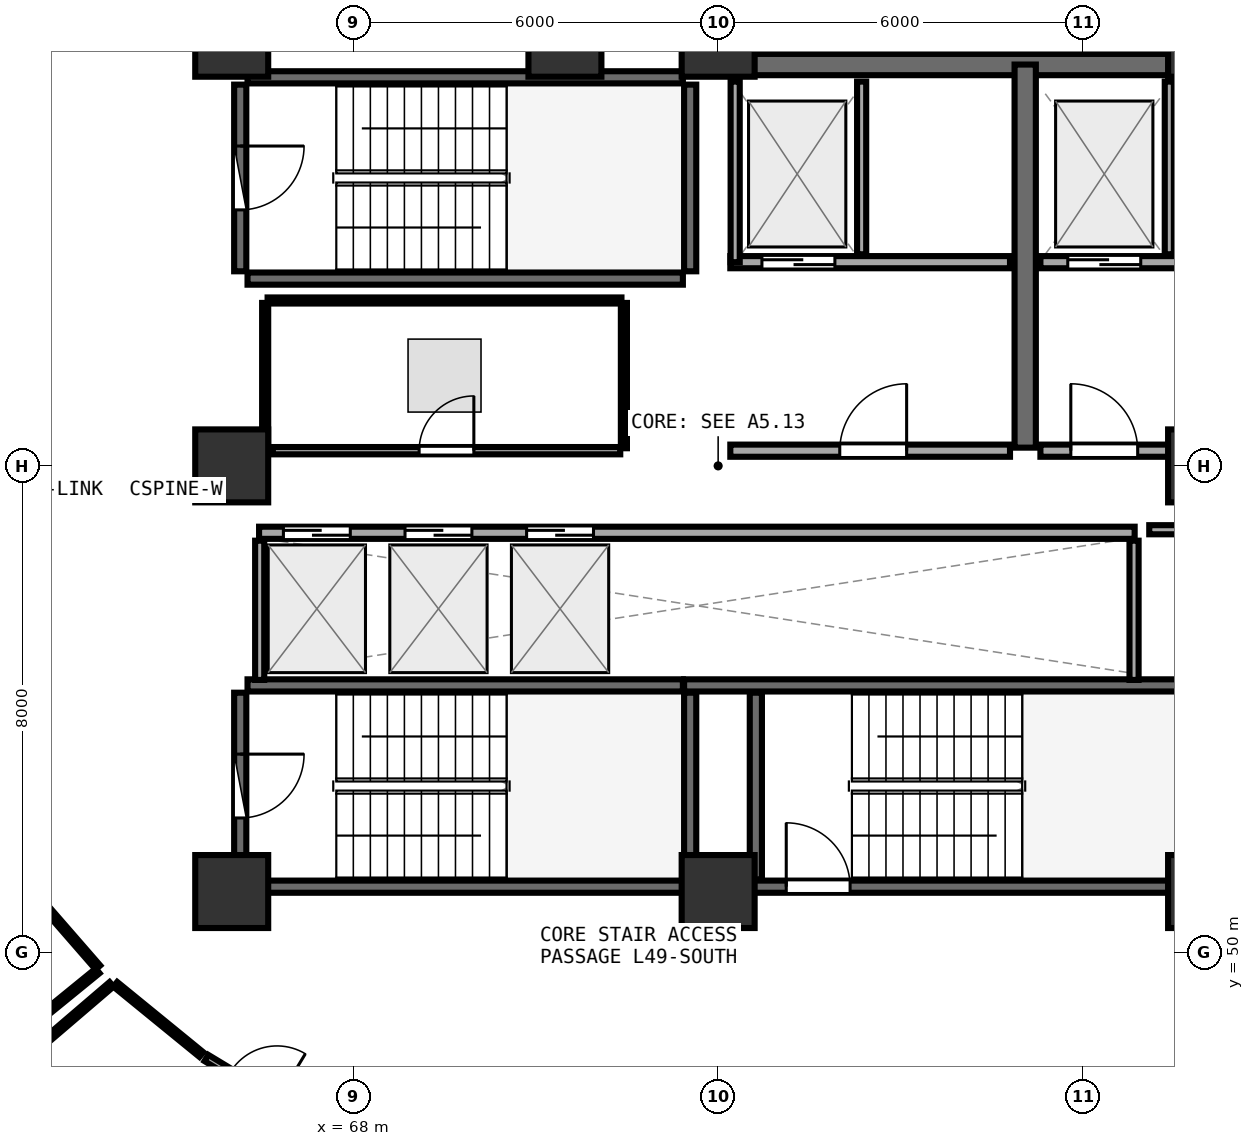
"""IFC4 building model, lengths in metres.
Left out: names, types, materials, properties, quantities, classifications, styles, units other than length and angle.
Written with IfcOpenShell. Run it as: python <this file> out.ifc"""

import sys

from ifc_helpers import new_model, si_unit, direction, frame, frame_2d, origin, origin_2d, place, context, subcontext, project, spatial, rectangle, extrude, element, fill, save


model = new_model("IFC4")
c1 = context("Model", 3, precision=1e-05, world=origin(), true_north=direction((0.0, 1.0)))
c2 = subcontext(c1, "Body", "Model", "MODEL_VIEW")
j1 = project(units=[si_unit("LENGTHUNIT", "METRE"), si_unit("PLANEANGLEUNIT", "RADIAN")], contexts=[c1])
p1 = place(None, origin())
s1 = spatial("IfcSite", under=j1, at=p1, CompositionType="ELEMENT")
p2 = place(p1, origin())
s2 = spatial("IfcBuilding", under=s1, at=p2, CompositionType="ELEMENT")
p3 = place(p2, frame((0.0, 0.0, 193.2)))
s3 = spatial("IfcBuildingStorey", under=s2, at=p3, CompositionType="ELEMENT", Elevation=193.2)
for number, where, z_axis, x_axis in (
    (1, (66.0, 51.0, 0.0), (0.0, 0.0, 1.0), (1.0, 0.0, 0.0)),
    (2, (74.0, 51.0, 0.0), (0.0, 0.0, 1.0), (1.0, 0.0, 0.0)),
    (3, (82.0, 51.0, 0.0), (0.0, 0.0, 1.0), (1.0, 0.0, 0.0)),
    (4, (82.0, 58.0, 0.0), (0.0, 0.0, 1.0), (1.0, 0.0, 0.0)),
    (5, (82.0, 65.0, 0.0), (0.0, 0.0, 1.0), (1.0, 0.0, 0.0)),
    (6, (74.0, 65.0, 0.0), (0.0, 0.0, 1.0), (1.0, 0.0, 0.0)),
    (7, (71.48, 65.0, 0.0), (0.0, 0.0, 1.0), (1.0, 0.0, 0.0)),
    (8, (66.0, 65.0, 0.0), (0.0, 0.0, 1.0), (1.0, 0.0, 0.0)),
    (9, (66.0, 58.0, 0.0), (0.0, 0.0, 1.0), (1.0, 0.0, 0.0)),
):
    element("IfcColumn", number, at=place(p3, frame(where, z_axis=z_axis, x_axis=x_axis)), inside=s3, PredefinedType="PILASTER", context=c2, shape_type="SweptSolid", body=[
        extrude(rectangle(XDim=1.2, YDim=1.2, at=origin_2d()), origin(), (0.0, 0.0, 1.0), 3.75),
    ])
p4 = place(p3, frame((66.26, 61.08, 0.0), z_axis=(0.0, 0.0, 1.0), x_axis=(1.0, 0.0, 0.0)))
e10 = element("IfcWall", 10, at=p4, inside=s3, PredefinedType="SHEAR", context=c2, shape_type="SweptSolid", body=[
    extrude(rectangle(XDim=7.16, YDim=0.2, at=frame_2d((3.58, 0.0))), origin(), (0.0, 0.0, 1.0), 3.49),
])
p5 = place(p3, frame((73.54, 61.2, 0.0), z_axis=(0.0, 0.0, 1.0), x_axis=(0.0, 1.0, 0.0)))
e11 = element("IfcWall", 11, at=p5, inside=s3, PredefinedType="SHEAR", context=c2, shape_type="SweptSolid", body=[
    extrude(rectangle(XDim=3.07, YDim=0.2, at=frame_2d((1.535, 0.0))), origin(), (0.0, 0.0, 1.0), 3.49),
])
p6 = place(p3, frame((73.42, 64.39, 0.0), z_axis=(0.0, 0.0, 1.0), x_axis=(-1.0, 0.0, 0.0)))
e12 = element("IfcWall", 12, at=p6, inside=s3, PredefinedType="SHEAR", context=c2, shape_type="SweptSolid", body=[
    extrude(rectangle(XDim=7.16, YDim=0.2, at=frame_2d((3.58, 0.0))), origin(), (0.0, 0.0, 1.0), 3.49),
])
p7 = place(p3, frame((66.14, 64.27, 0.0), z_axis=(0.0, 0.0, 1.0), x_axis=(0.0, -1.0, 0.0)))
e13 = element("IfcWall", 13, at=p7, inside=s3, PredefinedType="SHEAR", context=c2, shape_type="SweptSolid", body=[
    extrude(rectangle(XDim=3.07, YDim=0.2, at=frame_2d((1.535, 0.0))), origin(), (0.0, 0.0, 1.0), 3.49),
])
p8 = place(p7, frame((1.01, 0.0, 0.0)))
e14 = element("IfcOpeningElement", 14, at=p8, cuts=e13, PredefinedType="OPENING", context=c2, shape_type="SweptSolid", body=[
    extrude(rectangle(XDim=1.05, YDim=2.1, at=frame_2d((0.525, 1.05))), frame((0.0, 0.11, 0.0), z_axis=(0.0, -1.0, 0.0), x_axis=(1.0, 0.0, 0.0)), (0.0, 0.0, 1.0), 0.22),
])
p9 = place(p3, frame((74.0, 51.08, 0.0), z_axis=(0.0, 0.0, 1.0), x_axis=(1.0, 0.0, 0.0)))
e15 = element("IfcWall", 15, at=p9, inside=s3, PredefinedType="SHEAR", context=c2, shape_type="SweptSolid", body=[
    extrude(rectangle(XDim=7.9, YDim=0.2, at=frame_2d((3.95, 0.0))), origin(), (0.0, 0.0, 1.0), 3.49),
])
p10 = place(p9, frame((1.12, 0.0, 0.0)))
e16 = element("IfcOpeningElement", 16, at=p10, cuts=e15, PredefinedType="OPENING", context=c2, shape_type="SweptSolid", body=[
    extrude(rectangle(XDim=1.05, YDim=2.1, at=frame_2d((0.525, 1.05))), frame((0.0, 0.11, 0.0), z_axis=(0.0, -1.0, 0.0), x_axis=(1.0, 0.0, 0.0)), (0.0, 0.0, 1.0), 0.22),
])
p11 = place(p3, frame((81.9, 54.39, 0.0), z_axis=(0.0, 0.0, 1.0), x_axis=(-1.0, 0.0, 0.0)))
e17 = element("IfcWall", 17, at=p11, inside=s3, PredefinedType="SHEAR", context=c2, shape_type="SweptSolid", body=[
    extrude(rectangle(XDim=8.46, YDim=0.2, at=frame_2d((4.23, 0.0))), origin(), (0.0, 0.0, 1.0), 3.49),
])
p12 = place(p3, frame((74.62, 54.27, 0.0), z_axis=(0.0, 0.0, 1.0), x_axis=(0.0, -1.0, 0.0)))
e18 = element("IfcWall", 18, at=p12, inside=s3, PredefinedType="SHEAR", context=c2, shape_type="SweptSolid", body=[
    extrude(rectangle(XDim=3.07, YDim=0.2, at=frame_2d((1.535, 0.0))), origin(), (0.0, 0.0, 1.0), 3.49),
])
p13 = place(p3, frame((66.26, 51.08, 0.0), z_axis=(0.0, 0.0, 1.0), x_axis=(1.0, 0.0, 0.0)))
e19 = element("IfcWall", 19, at=p13, inside=s3, PredefinedType="SHEAR", context=c2, shape_type="SweptSolid", body=[
    extrude(rectangle(XDim=7.16, YDim=0.2, at=frame_2d((3.58, 0.0))), origin(), (0.0, 0.0, 1.0), 3.49),
])
p14 = place(p3, frame((73.54, 51.2, 0.0), z_axis=(0.0, 0.0, 1.0), x_axis=(0.0, 1.0, 0.0)))
e20 = element("IfcWall", 20, at=p14, inside=s3, PredefinedType="SHEAR", context=c2, shape_type="SweptSolid", body=[
    extrude(rectangle(XDim=3.07, YDim=0.2, at=frame_2d((1.535, 0.0))), origin(), (0.0, 0.0, 1.0), 3.49),
])
p15 = place(p3, frame((73.42, 54.39, 0.0), z_axis=(0.0, 0.0, 1.0), x_axis=(-1.0, 0.0, 0.0)))
e21 = element("IfcWall", 21, at=p15, inside=s3, PredefinedType="SHEAR", context=c2, shape_type="SweptSolid", body=[
    extrude(rectangle(XDim=7.16, YDim=0.2, at=frame_2d((3.58, 0.0))), origin(), (0.0, 0.0, 1.0), 3.49),
])
p16 = place(p3, frame((66.14, 54.27, 0.0), z_axis=(0.0, 0.0, 1.0), x_axis=(0.0, -1.0, 0.0)))
e22 = element("IfcWall", 22, at=p16, inside=s3, PredefinedType="SHEAR", context=c2, shape_type="SweptSolid", body=[
    extrude(rectangle(XDim=3.07, YDim=0.2, at=frame_2d((1.535, 0.0))), origin(), (0.0, 0.0, 1.0), 3.49),
])
p17 = place(p16, frame((1.01, 0.0, 0.0)))
e23 = element("IfcOpeningElement", 23, at=p17, cuts=e22, PredefinedType="OPENING", context=c2, shape_type="SweptSolid", body=[
    extrude(rectangle(XDim=1.05, YDim=2.1, at=frame_2d((0.525, 1.05))), frame((0.0, 0.11, 0.0), z_axis=(0.0, -1.0, 0.0), x_axis=(1.0, 0.0, 0.0)), (0.0, 0.0, 1.0), 0.22),
])
p18 = place(p3, frame((74.0, 64.6, 0.0), z_axis=(0.0, 0.0, 1.0), x_axis=(1.0, 0.0, 0.0)))
e24 = element("IfcWall", 24, at=p18, inside=s3, PredefinedType="SHEAR", context=c2, shape_type="SweptSolid", body=[
    extrude(rectangle(XDim=8.0, YDim=0.35, at=frame_2d((4.0, 0.0))), origin(), (0.0, 0.0, 1.0), 3.49),
])
p19 = place(p3, frame((79.05, 58.3, 0.0), z_axis=(0.0, 0.0, 1.0), x_axis=(0.0, 1.0, 0.0)))
e25 = element("IfcWall", 25, at=p19, inside=s3, PredefinedType="SHEAR", context=c2, shape_type="SweptSolid", body=[
    extrude(rectangle(XDim=6.3, YDim=0.35, at=frame_2d((3.15, 0.0))), origin(), (0.0, 0.0, 1.0), 3.49),
])
p20 = place(p3, frame((74.2, 61.35, 0.0), z_axis=(0.0, 0.0, 1.0), x_axis=(1.0, 0.0, 0.0)))
e26 = element("IfcWall", 26, at=p20, inside=s3, PredefinedType="SOLIDWALL", context=c2, shape_type="SweptSolid", body=[
    extrude(rectangle(XDim=4.6, YDim=0.2, at=frame_2d((2.3, 0.0))), origin(), (0.0, 0.0, 1.0), 3.48),
])
p21 = place(p20, frame((0.52, 0.0, 0.0)))
e27 = element("IfcOpeningElement", 27, at=p21, cuts=e26, PredefinedType="OPENING", context=c2, shape_type="SweptSolid", body=[
    extrude(rectangle(XDim=1.2, YDim=2.15, at=frame_2d((0.6, 1.075))), frame((0.0, 0.11, 0.0), z_axis=(0.0, -1.0, 0.0), x_axis=(1.0, 0.0, 0.0)), (0.0, 0.0, 1.0), 0.22),
])
p22 = place(p3, frame((74.28, 61.35, 0.0), z_axis=(0.0, 0.0, 1.0), x_axis=(0.0, 1.0, 0.0)))
e28 = element("IfcWall", 28, at=p22, inside=s3, PredefinedType="PARTITIONING", context=c2, shape_type="SweptSolid", body=[
    extrude(rectangle(XDim=2.97, YDim=0.15, at=frame_2d((1.485, 0.0))), origin(), (0.0, 0.0, 1.0), 3.48),
])
p23 = place(p3, frame((76.36, 61.48, 0.0), z_axis=(0.0, 0.0, 1.0), x_axis=(0.0, 1.0, 0.0)))
e29 = element("IfcWall", 29, at=p23, inside=s3, PredefinedType="PARTITIONING", context=c2, shape_type="SweptSolid", body=[
    extrude(rectangle(XDim=2.84, YDim=0.15, at=frame_2d((1.42, 0.0))), origin(), (0.0, 0.0, 1.0), 3.48),
])
p24 = place(p3, frame((79.3, 61.35, 0.0), z_axis=(0.0, 0.0, 1.0), x_axis=(1.0, 0.0, 0.0)))
e30 = element("IfcWall", 30, at=p24, inside=s3, PredefinedType="SOLIDWALL", context=c2, shape_type="SweptSolid", body=[
    extrude(rectangle(XDim=4.0, YDim=0.2, at=frame_2d((2.0, 0.0))), origin(), (0.0, 0.0, 1.0), 2.775),
])
p25 = place(p24, frame((0.45, 0.0, 0.0)))
e31 = element("IfcOpeningElement", 31, at=p25, cuts=e30, PredefinedType="OPENING", context=c2, shape_type="SweptSolid", body=[
    extrude(rectangle(XDim=1.2, YDim=2.15, at=frame_2d((0.6, 1.075))), frame((0.0, 0.11, 0.0), z_axis=(0.0, -1.0, 0.0), x_axis=(1.0, 0.0, 0.0)), (0.0, 0.0, 1.0), 0.22),
])
p26 = place(p3, frame((81.42, 61.48, 0.0), z_axis=(0.0, 0.0, 1.0), x_axis=(0.0, 1.0, 0.0)))
e32 = element("IfcWall", 32, at=p26, inside=s3, PredefinedType="PARTITIONING", context=c2, shape_type="SweptSolid", body=[
    extrude(rectangle(XDim=2.84, YDim=0.15, at=frame_2d((1.42, 0.0))), origin(), (0.0, 0.0, 1.0), 3.48),
])
p27 = place(p3, frame((74.2, 58.25, 0.0), z_axis=(0.0, 0.0, 1.0), x_axis=(1.0, 0.0, 0.0)))
e33 = element("IfcWall", 33, at=p27, inside=s3, PredefinedType="SOLIDWALL", context=c2, shape_type="SweptSolid", body=[
    extrude(rectangle(XDim=4.6, YDim=0.2, at=frame_2d((2.3, 0.0))), origin(), (0.0, 0.0, 1.0), 3.48),
])
p28 = place(p27, frame((1.8, 0.0, 0.0)))
e34 = element("IfcOpeningElement", 34, at=p28, cuts=e33, PredefinedType="OPENING", context=c2, shape_type="SweptSolid", body=[
    extrude(rectangle(XDim=1.1, YDim=2.1, at=frame_2d((0.55, 1.05))), frame((0.0, 0.11, 0.0), z_axis=(0.0, -1.0, 0.0), x_axis=(1.0, 0.0, 0.0)), (0.0, 0.0, 1.0), 0.22),
])
p29 = place(p3, frame((79.3, 58.25, 0.0), z_axis=(0.0, 0.0, 1.0), x_axis=(1.0, 0.0, 0.0)))
e35 = element("IfcWall", 35, at=p29, inside=s3, PredefinedType="SOLIDWALL", context=c2, shape_type="SweptSolid", body=[
    extrude(rectangle(XDim=4.0, YDim=0.2, at=frame_2d((2.0, 0.0))), origin(), (0.0, 0.0, 1.0), 2.775),
])
p30 = place(p29, frame((0.5, 0.0, 0.0)))
e36 = element("IfcOpeningElement", 36, at=p30, cuts=e35, PredefinedType="OPENING", context=c2, shape_type="SweptSolid", body=[
    extrude(rectangle(XDim=1.1, YDim=2.1, at=frame_2d((0.55, 1.05))), frame((0.0, 0.11, 0.0), z_axis=(0.0, -1.0, 0.0), x_axis=(1.0, 0.0, 0.0)), (0.0, 0.0, 1.0), 0.22),
])
p31 = place(p3, frame((66.45, 56.9, 0.0), z_axis=(0.0, 0.0, 1.0), x_axis=(1.0, 0.0, 0.0)))
e37 = element("IfcWall", 37, at=p31, inside=s3, PredefinedType="SOLIDWALL", context=c2, shape_type="SweptSolid", body=[
    extrude(rectangle(XDim=14.4, YDim=0.2, at=frame_2d((7.2, 0.0))), origin(), (0.0, 0.0, 1.0), 3.48),
])
p32 = place(p31, frame((0.4, 0.0, 0.0)))
e38 = element("IfcOpeningElement", 38, at=p32, cuts=e37, PredefinedType="OPENING", context=c2, shape_type="SweptSolid", body=[
    extrude(rectangle(XDim=1.1, YDim=2.1, at=frame_2d((0.55, 1.05))), frame((0.0, 0.11, 0.0), z_axis=(0.0, -1.0, 0.0), x_axis=(1.0, 0.0, 0.0)), (0.0, 0.0, 1.0), 0.22),
])
p33 = place(p31, frame((2.4, 0.0, 0.0)))
e39 = element("IfcOpeningElement", 39, at=p33, cuts=e37, PredefinedType="OPENING", context=c2, shape_type="SweptSolid", body=[
    extrude(rectangle(XDim=1.1, YDim=2.1, at=frame_2d((0.55, 1.05))), frame((0.0, 0.11, 0.0), z_axis=(0.0, -1.0, 0.0), x_axis=(1.0, 0.0, 0.0)), (0.0, 0.0, 1.0), 0.22),
])
p34 = place(p31, frame((4.4, 0.0, 0.0)))
e40 = element("IfcOpeningElement", 40, at=p34, cuts=e37, PredefinedType="OPENING", context=c2, shape_type="SweptSolid", body=[
    extrude(rectangle(XDim=1.1, YDim=2.1, at=frame_2d((0.55, 1.05))), frame((0.0, 0.11, 0.0), z_axis=(0.0, -1.0, 0.0), x_axis=(1.0, 0.0, 0.0)), (0.0, 0.0, 1.0), 0.22),
])
for number, where, z_axis, x_axis in (
    (41, (66.46, 54.48, 0.0), (0.0, 0.0, 1.0), (0.0, 1.0, 0.0)),
    (42, (80.84, 54.48, 0.0), (0.0, 0.0, 1.0), (0.0, 1.0, 0.0)),
):
    element("IfcWall", number, at=place(p3, frame(where, z_axis=z_axis, x_axis=x_axis)), inside=s3, PredefinedType="PARTITIONING", context=c2, shape_type="SweptSolid", body=[
        extrude(rectangle(XDim=2.29, YDim=0.15, at=frame_2d((1.145, 0.0))), origin(), (0.0, 0.0, 1.0), 3.48),
    ])
p35 = place(p3, frame((66.675, 58.25, 0.0), z_axis=(0.0, 0.0, 1.0), x_axis=(1.0, 0.0, 0.0)))
e43 = element("IfcWall", 43, at=p35, inside=s3, PredefinedType="PARTITIONING", context=c2, shape_type="SweptSolid", body=[
    extrude(rectangle(XDim=5.715, YDim=0.12, at=frame_2d((2.857, 0.0))), origin(), (0.0, 0.0, 1.0), 3.48),
])
p36 = place(p35, frame((2.407, 0.0, 0.0)))
e44 = element("IfcOpeningElement", 44, at=p36, cuts=e43, PredefinedType="OPENING", context=c2, shape_type="SweptSolid", body=[
    extrude(rectangle(XDim=0.9, YDim=2.08, at=frame_2d((0.45, 1.04))), frame((0.0, 0.07, 0.0), z_axis=(0.0, -1.0, 0.0), x_axis=(1.0, 0.0, 0.0)), (0.0, 0.0, 1.0), 0.14),
])
p37 = place(p3, frame((65.583, 48.263, 0.0), z_axis=(0.0, 0.0, 1.0), x_axis=(0.856160990593, -0.516709162089, 0.0)))
e45 = element("IfcWall", 45, at=p37, inside=s3, PredefinedType="PARTITIONING", context=c2, shape_type="SweptSolid", body=[
    extrude(rectangle(XDim=1.815, YDim=0.12, at=frame_2d((0.908, 0.0))), origin(), (0.0, 0.0, 1.0), 3.48),
])
p38 = place(p37, frame((0.458, 0.0, 0.0)))
e46 = element("IfcOpeningElement", 46, at=p38, cuts=e45, PredefinedType="OPENING", context=c2, shape_type="SweptSolid", body=[
    extrude(rectangle(XDim=0.9, YDim=2.08, at=frame_2d((0.45, 1.04))), frame((0.0, 0.07, 0.0), z_axis=(0.0, -1.0, 0.0), x_axis=(1.0, 0.0, 0.0)), (0.0, 0.0, 1.0), 0.14),
])
p39 = place(p3, frame((82.64, 56.95, 0.0), z_axis=(0.0, 0.0, 1.0), x_axis=(-1.0, 0.0, 0.0)))
e47 = element("IfcWall", 47, at=p39, inside=s3, PredefinedType="PARTITIONING", context=c2, shape_type="SweptSolid", body=[
    extrude(rectangle(XDim=1.55, YDim=0.15, at=frame_2d((0.775, 0.0))), origin(), (0.0, 0.0, 1.0), 2.775),
])
p40 = place(p3, frame((72.45, 58.29, 0.0), z_axis=(0.0, 0.0, 1.0), x_axis=(0.0, 1.0, 0.0)))
e48 = element("IfcWall", 48, at=p40, inside=s3, PredefinedType="PARTITIONING", context=c2, shape_type="SweptSolid", body=[
    extrude(rectangle(XDim=2.39, YDim=0.1, at=frame_2d((1.195, 0.0))), origin(), (0.0, 0.0, 1.0), 3.48),
])
p41 = place(p3, frame((72.41, 60.72, 0.0), z_axis=(0.0, 0.0, 1.0), x_axis=(-1.0, 0.0, 0.0)))
e49 = element("IfcWall", 49, at=p41, inside=s3, PredefinedType="PARTITIONING", context=c2, shape_type="SweptSolid", body=[
    extrude(rectangle(XDim=5.82, YDim=0.1, at=frame_2d((2.91, 0.0))), origin(), (0.0, 0.0, 1.0), 3.48),
])
p42 = place(p3, frame((66.55, 60.68, 0.0), z_axis=(0.0, 0.0, 1.0), x_axis=(0.0, -1.0, 0.0)))
e50 = element("IfcWall", 50, at=p42, inside=s3, PredefinedType="PARTITIONING", context=c2, shape_type="SweptSolid", body=[
    extrude(rectangle(XDim=2.383, YDim=0.1, at=frame_2d((1.191, 0.0))), origin(), (0.0, 0.0, 1.0), 3.48),
])
p43 = place(p3, frame((81.517, 47.692, 0.0), z_axis=(0.0, 0.0, 1.0), x_axis=(0.730053355202, 0.683390151055, 0.0)))
e51 = element("IfcWall", 51, at=p43, inside=s3, PredefinedType="PARTITIONING", context=c2, shape_type="SweptSolid", body=[
    extrude(rectangle(XDim=5.839, YDim=0.1, at=frame_2d((2.919, 0.0))), origin(), (0.0, 0.0, 1.0), 3.025),
])
p44 = place(p3, frame((62.622, 51.104, 0.0), z_axis=(0.0, 0.0, 1.0), x_axis=(0.656613410786, -0.754227305775, 0.0)))
e52 = element("IfcWall", 52, at=p44, inside=s3, PredefinedType="PARTITIONING", context=c2, shape_type="SweptSolid", body=[
    extrude(rectangle(XDim=1.793, YDim=0.1, at=frame_2d((0.896, 0.0))), origin(), (0.0, 0.0, 1.0), 3.025),
])
p45 = place(p3, frame((63.795, 49.696, 0.0), z_axis=(0.0, 0.0, 1.0), x_axis=(-0.775218498775, -0.631693184353, 0.0)))
e53 = element("IfcWall", 53, at=p45, inside=s3, PredefinedType="PARTITIONING", context=c2, shape_type="SweptSolid", body=[
    extrude(rectangle(XDim=7.52, YDim=0.1, at=frame_2d((3.76, 0.0))), origin(), (0.0, 0.0, 1.0), 3.025),
])
p46 = place(p3, frame((64.085, 49.475, 0.0), z_axis=(0.0, 0.0, 1.0), x_axis=(0.774837468284, -0.632160499986, 0.0)))
e54 = element("IfcWall", 54, at=p46, inside=s3, PredefinedType="PARTITIONING", context=c2, shape_type="SweptSolid", body=[
    extrude(rectangle(XDim=1.827, YDim=0.1, at=frame_2d((0.914, 0.0))), origin(), (0.0, 0.0, 1.0), 3.025),
])
p47 = place(p3, frame((58.325, 44.597, 0.0), z_axis=(0.0, 0.0, 1.0), x_axis=(0.759718239, 0.650252410476, 0.0)))
e55 = element("IfcWall", 55, at=p47, inside=s3, PredefinedType="PARTITIONING", context=c2, shape_type="SweptSolid", body=[
    extrude(rectangle(XDim=7.5, YDim=0.1, at=frame_2d((3.75, 0.0))), origin(), (0.0, 0.0, 1.0), 3.075),
])
p48 = place(p8, origin())
e56 = element("IfcDoor", 56, at=p48, inside=s3, OperationType="SINGLE_SWING_LEFT", PredefinedType="DOOR", context=c2, shape_type="SweptSolid", body=[
    extrude(rectangle(XDim=1.05, YDim=2.1, at=frame_2d((0.525, 1.05))), frame((0.0, 0.025, 0.0), z_axis=(0.0, -1.0, 0.0), x_axis=(1.0, 0.0, 0.0)), (0.0, 0.0, 1.0), 0.05),
])
fill(e14, e56)
p49 = place(p10, origin())
e57 = element("IfcDoor", 57, at=p49, inside=s3, OperationType="SINGLE_SWING_LEFT", PredefinedType="DOOR", context=c2, shape_type="SweptSolid", body=[
    extrude(rectangle(XDim=1.05, YDim=2.1, at=frame_2d((0.525, 1.05))), frame((0.0, 0.025, 0.0), z_axis=(0.0, -1.0, 0.0), x_axis=(1.0, 0.0, 0.0)), (0.0, 0.0, 1.0), 0.05),
])
fill(e16, e57)
p50 = place(p17, origin())
e58 = element("IfcDoor", 58, at=p50, inside=s3, OperationType="SINGLE_SWING_LEFT", PredefinedType="DOOR", context=c2, shape_type="SweptSolid", body=[
    extrude(rectangle(XDim=1.05, YDim=2.1, at=frame_2d((0.525, 1.05))), frame((0.0, 0.025, 0.0), z_axis=(0.0, -1.0, 0.0), x_axis=(1.0, 0.0, 0.0)), (0.0, 0.0, 1.0), 0.05),
])
fill(e23, e58)
p51 = place(p21, origin())
e59 = element("IfcDoor", 59, at=p51, inside=s3, OperationType="DOUBLE_DOOR_SLIDING", PredefinedType="DOOR", context=c2, shape_type="SweptSolid", body=[
    extrude(rectangle(XDim=1.2, YDim=2.15, at=frame_2d((0.6, 1.075))), frame((0.0, 0.025, 0.0), z_axis=(0.0, -1.0, 0.0), x_axis=(1.0, 0.0, 0.0)), (0.0, 0.0, 1.0), 0.05),
])
fill(e27, e59)
p52 = place(p25, origin())
e60 = element("IfcDoor", 60, at=p52, inside=s3, OperationType="DOUBLE_DOOR_SLIDING", PredefinedType="DOOR", context=c2, shape_type="SweptSolid", body=[
    extrude(rectangle(XDim=1.2, YDim=2.15, at=frame_2d((0.6, 1.075))), frame((0.0, 0.025, 0.0), z_axis=(0.0, -1.0, 0.0), x_axis=(1.0, 0.0, 0.0)), (0.0, 0.0, 1.0), 0.05),
])
fill(e31, e60)
p53 = place(p28, frame((1.1, 0.0, 0.0), z_axis=(0.0, 0.0, 1.0), x_axis=(-1.0, 0.0, 0.0)))
e61 = element("IfcDoor", 61, at=p53, inside=s3, OperationType="SINGLE_SWING_LEFT", PredefinedType="DOOR", context=c2, shape_type="SweptSolid", body=[
    extrude(rectangle(XDim=1.1, YDim=2.1, at=frame_2d((0.55, 1.05))), frame((0.0, 0.025, 0.0), z_axis=(0.0, -1.0, 0.0), x_axis=(1.0, 0.0, 0.0)), (0.0, 0.0, 1.0), 0.05),
])
fill(e34, e61)
p54 = place(p30, frame((1.1, 0.0, 0.0), z_axis=(0.0, 0.0, 1.0), x_axis=(-1.0, 0.0, 0.0)))
e62 = element("IfcDoor", 62, at=p54, inside=s3, OperationType="SINGLE_SWING_RIGHT", PredefinedType="DOOR", context=c2, shape_type="SweptSolid", body=[
    extrude(rectangle(XDim=1.1, YDim=2.1, at=frame_2d((0.55, 1.05))), frame((0.0, 0.025, 0.0), z_axis=(0.0, -1.0, 0.0), x_axis=(1.0, 0.0, 0.0)), (0.0, 0.0, 1.0), 0.05),
])
fill(e36, e62)
p55 = place(p32, origin())
e63 = element("IfcDoor", 63, at=p55, inside=s3, OperationType="DOUBLE_DOOR_SLIDING", PredefinedType="DOOR", context=c2, shape_type="SweptSolid", body=[
    extrude(rectangle(XDim=1.1, YDim=2.1, at=frame_2d((0.55, 1.05))), frame((0.0, 0.025, 0.0), z_axis=(0.0, -1.0, 0.0), x_axis=(1.0, 0.0, 0.0)), (0.0, 0.0, 1.0), 0.05),
])
fill(e38, e63)
p56 = place(p33, origin())
e64 = element("IfcDoor", 64, at=p56, inside=s3, OperationType="DOUBLE_DOOR_SLIDING", PredefinedType="DOOR", context=c2, shape_type="SweptSolid", body=[
    extrude(rectangle(XDim=1.1, YDim=2.1, at=frame_2d((0.55, 1.05))), frame((0.0, 0.025, 0.0), z_axis=(0.0, -1.0, 0.0), x_axis=(1.0, 0.0, 0.0)), (0.0, 0.0, 1.0), 0.05),
])
fill(e39, e64)
p57 = place(p34, origin())
e65 = element("IfcDoor", 65, at=p57, inside=s3, OperationType="DOUBLE_DOOR_SLIDING", PredefinedType="DOOR", context=c2, shape_type="SweptSolid", body=[
    extrude(rectangle(XDim=1.1, YDim=2.1, at=frame_2d((0.55, 1.05))), frame((0.0, 0.025, 0.0), z_axis=(0.0, -1.0, 0.0), x_axis=(1.0, 0.0, 0.0)), (0.0, 0.0, 1.0), 0.05),
])
fill(e40, e65)
p58 = place(p36, origin())
e66 = element("IfcDoor", 66, at=p58, inside=s3, OperationType="SINGLE_SWING_RIGHT", PredefinedType="DOOR", context=c2, shape_type="SweptSolid", body=[
    extrude(rectangle(XDim=0.9, YDim=2.08, at=frame_2d((0.45, 1.04))), frame((0.0, 0.025, 0.0), z_axis=(0.0, -1.0, 0.0), x_axis=(1.0, 0.0, 0.0)), (0.0, 0.0, 1.0), 0.05),
])
fill(e44, e66)
save(model, sys.argv[1])
